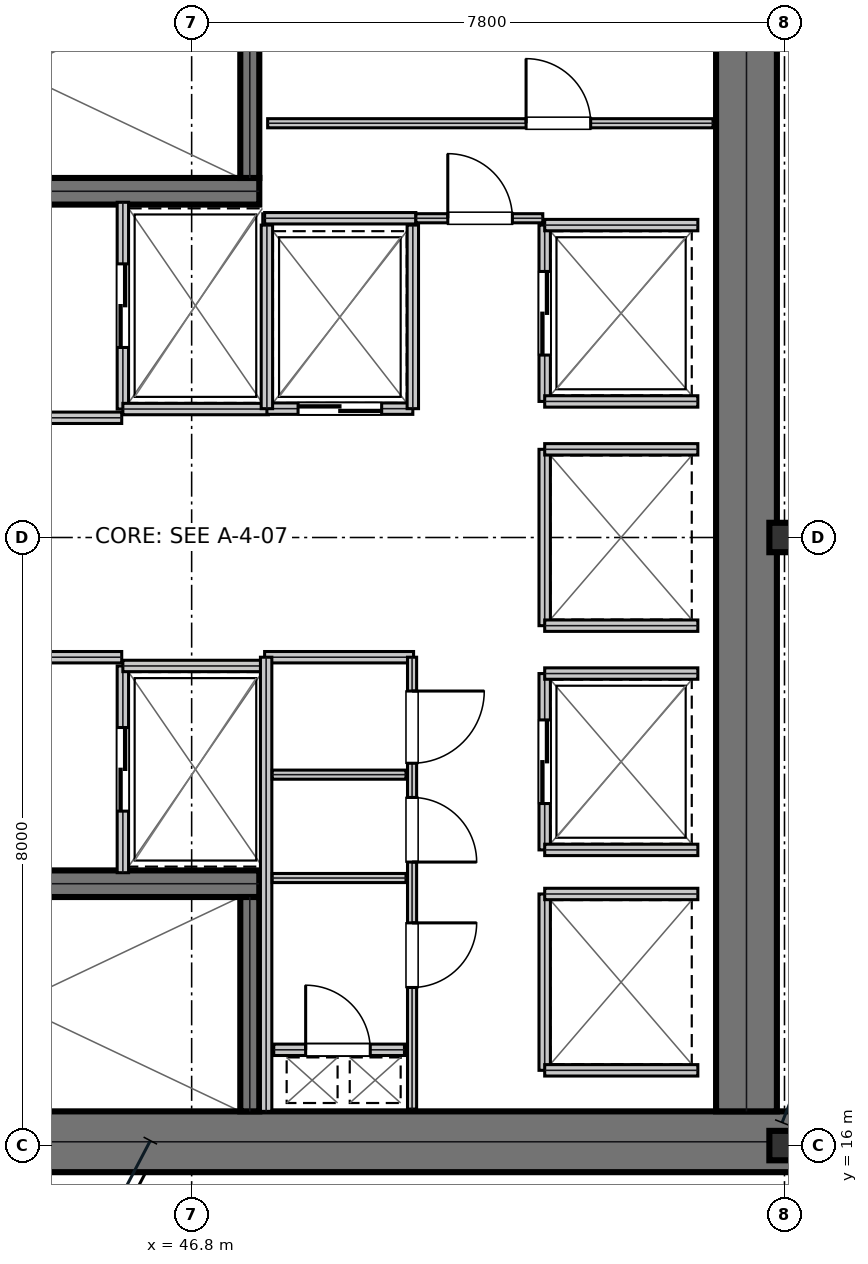
"""IFC4 building model, lengths in metres.
Left out: names, types, materials, properties, quantities, classifications, styles, units other than length and angle.
Written with IfcOpenShell. Run it as: python <this file> out.ifc"""

import sys

from ifc_helpers import new_model, si_unit, direction, frame, frame_2d, origin, origin_2d, place, context, subcontext, project, spatial, rectangle, i_section, extrude, element, fill, save


model = new_model("IFC4")
c1 = context("Model", 3, precision=1e-05, world=origin(), true_north=direction((0.0, 1.0)))
c2 = subcontext(c1, "Body", "Model", "MODEL_VIEW")
j1 = project(units=[si_unit("LENGTHUNIT", "METRE"), si_unit("PLANEANGLEUNIT", "RADIAN")], contexts=[c1])
p1 = place(None, origin())
s1 = spatial("IfcSite", under=j1, at=p1, CompositionType="ELEMENT")
p2 = place(p1, origin())
s2 = spatial("IfcBuilding", under=s1, at=p2, CompositionType="ELEMENT")
p3 = place(p2, frame((0.0, 0.0, 145.2)))
s3 = spatial("IfcBuildingStorey", under=s2, at=p3, CompositionType="ELEMENT", Elevation=145.2)
p4 = place(p3, frame((38.8, 16.05, 0.0), z_axis=(0.0, 0.0, 1.0), x_axis=(1.0, 0.0, 0.0)))
e1 = element("IfcWall", 1, at=p4, inside=s3, PredefinedType="SHEAR", context=c2, shape_type="SweptSolid", body=[
    extrude(rectangle(XDim=16.0, YDim=0.8, at=frame_2d((8.0, 0.0))), origin(), (0.0, 0.0, 1.0), 3.81),
])
p5 = place(p3, frame((54.1, 16.45, 0.0), z_axis=(0.0, 0.0, 1.0), x_axis=(0.0, 1.0, 0.0)))
e2 = element("IfcWall", 2, at=p5, inside=s3, PredefinedType="SHEAR", context=c2, shape_type="SweptSolid", body=[
    extrude(rectangle(XDim=15.1, YDim=0.8, at=frame_2d((7.55, 0.0))), origin(), (0.0, 0.0, 1.0), 3.81),
])
p6 = place(p3, frame((39.98, 28.555, 0.0), z_axis=(0.0, 0.0, 1.0), x_axis=(1.0, 0.0, 0.0)))
e3 = element("IfcWall", 3, at=p6, inside=s3, PredefinedType="SHEAR", context=c2, shape_type="SweptSolid", body=[
    extrude(rectangle(XDim=7.71, YDim=0.35, at=frame_2d((3.855, 0.0))), origin(), (0.0, 0.0, 1.0), 3.81),
])
p7 = place(p6, frame((0.25, 0.0, 0.0)))
e4 = element("IfcOpeningElement", 4, at=p7, cuts=e3, PredefinedType="OPENING", context=c2, shape_type="SweptSolid", body=[
    extrude(rectangle(XDim=1.1, YDim=2.15, at=frame_2d((0.55, 1.075))), frame((0.0, 0.185, 0.0), z_axis=(0.0, -1.0, 0.0), x_axis=(1.0, 0.0, 0.0)), (0.0, 0.0, 1.0), 0.37),
])
p8 = place(p3, frame((39.98, 19.445, 0.0), z_axis=(0.0, 0.0, 1.0), x_axis=(1.0, 0.0, 0.0)))
e5 = element("IfcWall", 5, at=p8, inside=s3, PredefinedType="SHEAR", context=c2, shape_type="SweptSolid", body=[
    extrude(rectangle(XDim=7.71, YDim=0.35, at=frame_2d((3.855, 0.0))), origin(), (0.0, 0.0, 1.0), 3.81),
])
p9 = place(p8, frame((0.25, 0.0, 0.0)))
e6 = element("IfcOpeningElement", 6, at=p9, cuts=e5, PredefinedType="OPENING", context=c2, shape_type="SweptSolid", body=[
    extrude(rectangle(XDim=1.1, YDim=2.15, at=frame_2d((0.55, 1.075))), frame((0.0, 0.185, 0.0), z_axis=(0.0, -1.0, 0.0), x_axis=(1.0, 0.0, 0.0)), (0.0, 0.0, 1.0), 0.37),
])
for number, where, z_axis, x_axis in (
    (7, (47.565, 28.73, 0.0), (0.0, 0.0, 1.0), (0.0, 1.0, 0.0)),
    (8, (47.565, 16.45, 0.0), (0.0, 0.0, 1.0), (0.0, 1.0, 0.0)),
):
    element("IfcWall", number, at=place(p3, frame(where, z_axis=z_axis, x_axis=x_axis)), inside=s3, PredefinedType="SHEAR", context=c2, shape_type="SweptSolid", body=[
        extrude(rectangle(XDim=2.82, YDim=0.25, at=frame_2d((1.41, 0.0))), origin(), (0.0, 0.0, 1.0), 3.81),
    ])
for number, where, z_axis, x_axis in (
    (9, (54.6, 16.0, 0.0), (0.0, 0.0, 1.0), (1.0, 0.0, 0.0)),
    (10, (54.6, 24.0, 0.0), (0.0, 0.0, 1.0), (1.0, 0.0, 0.0)),
):
    element("IfcColumn", number, at=place(p3, frame(where, z_axis=z_axis, x_axis=x_axis)), inside=s3, PredefinedType="COLUMN", context=c2, shape_type="SweptSolid", body=[
        extrude(i_section(OverallWidth=0.398, OverallDepth=0.387, WebThickness=0.021, FlangeThickness=0.033, at=origin_2d()), origin(), (0.0, 0.0, 1.0), 4.044),
    ])
p10 = place(p3, frame((39.98, 25.575, 0.0), z_axis=(0.0, 0.0, 1.0), x_axis=(1.0, 0.0, 0.0)))
e11 = element("IfcWall", 11, at=p10, inside=s3, PredefinedType="PARTITIONING", context=c2, shape_type="SweptSolid", body=[
    extrude(rectangle(XDim=5.9, YDim=0.15, at=frame_2d((2.95, 0.0))), origin(), (0.0, 0.0, 1.0), 3.81),
])
p11 = place(p10, frame((2.35, 0.0, 0.0)))
e12 = element("IfcOpeningElement", 12, at=p11, cuts=e11, PredefinedType="OPENING", context=c2, shape_type="SweptSolid", body=[
    extrude(rectangle(XDim=1.05, YDim=2.15, at=frame_2d((0.525, 1.075))), frame((0.0, 0.085, 0.0), z_axis=(0.0, -1.0, 0.0), x_axis=(1.0, 0.0, 0.0)), (0.0, 0.0, 1.0), 0.17),
])
p12 = place(p3, frame((39.98, 22.425, 0.0), z_axis=(0.0, 0.0, 1.0), x_axis=(1.0, 0.0, 0.0)))
e13 = element("IfcWall", 13, at=p12, inside=s3, PredefinedType="PARTITIONING", context=c2, shape_type="SweptSolid", body=[
    extrude(rectangle(XDim=5.9, YDim=0.15, at=frame_2d((2.95, 0.0))), origin(), (0.0, 0.0, 1.0), 3.81),
])
p13 = place(p12, frame((2.35, 0.0, 0.0)))
e14 = element("IfcOpeningElement", 14, at=p13, cuts=e13, PredefinedType="OPENING", context=c2, shape_type="SweptSolid", body=[
    extrude(rectangle(XDim=1.05, YDim=2.15, at=frame_2d((0.525, 1.075))), frame((0.0, 0.085, 0.0), z_axis=(0.0, -1.0, 0.0), x_axis=(1.0, 0.0, 0.0)), (0.0, 0.0, 1.0), 0.17),
])
p14 = place(p3, frame((45.895, 25.69, 0.0), z_axis=(0.0, 0.0, 1.0), x_axis=(0.0, 1.0, 0.0)))
e15 = element("IfcWall", 15, at=p14, inside=s3, PredefinedType="PARTITIONING", context=c2, shape_type="SweptSolid", body=[
    extrude(rectangle(XDim=2.72, YDim=0.15, at=frame_2d((1.36, 0.0))), origin(), (0.0, 0.0, 1.0), 3.81),
])
p15 = place(p14, frame((0.81, 0.0, 0.0)))
e16 = element("IfcOpeningElement", 16, at=p15, cuts=e15, PredefinedType="OPENING", context=c2, shape_type="SweptSolid", body=[
    extrude(rectangle(XDim=1.1, YDim=2.15, at=frame_2d((0.55, 1.075))), frame((0.0, 0.085, 0.0), z_axis=(0.0, -1.0, 0.0), x_axis=(1.0, 0.0, 0.0)), (0.0, 0.0, 1.0), 0.17),
])
p16 = place(p3, frame((45.895, 25.69, 0.0), z_axis=(0.0, 0.0, 1.0), x_axis=(1.0, 0.0, 0.0)))
e17 = element("IfcWall", 17, at=p16, inside=s3, PredefinedType="PARTITIONING", context=c2, shape_type="SweptSolid", body=[
    extrude(rectangle(XDim=1.915, YDim=0.15, at=frame_2d((0.958, 0.0))), origin(), (0.0, 0.0, 1.0), 3.81),
])
p17 = place(p3, frame((45.895, 19.59, 0.0), z_axis=(0.0, 0.0, 1.0), x_axis=(0.0, 1.0, 0.0)))
e18 = element("IfcWall", 18, at=p17, inside=s3, PredefinedType="PARTITIONING", context=c2, shape_type="SweptSolid", body=[
    extrude(rectangle(XDim=2.72, YDim=0.15, at=frame_2d((1.36, 0.0))), origin(), (0.0, 0.0, 1.0), 3.81),
])
p18 = place(p17, frame((0.81, 0.0, 0.0)))
e19 = element("IfcOpeningElement", 19, at=p18, cuts=e18, PredefinedType="OPENING", context=c2, shape_type="SweptSolid", body=[
    extrude(rectangle(XDim=1.1, YDim=2.15, at=frame_2d((0.55, 1.075))), frame((0.0, 0.085, 0.0), z_axis=(0.0, -1.0, 0.0), x_axis=(1.0, 0.0, 0.0)), (0.0, 0.0, 1.0), 0.17),
])
p19 = place(p3, frame((45.895, 22.31, 0.0), z_axis=(0.0, 0.0, 1.0), x_axis=(1.0, 0.0, 0.0)))
e20 = element("IfcWall", 20, at=p19, inside=s3, PredefinedType="PARTITIONING", context=c2, shape_type="SweptSolid", body=[
    extrude(rectangle(XDim=1.915, YDim=0.15, at=frame_2d((0.958, 0.0))), origin(), (0.0, 0.0, 1.0), 3.81),
])
p20 = place(p3, frame((47.79, 25.695, 0.0), z_axis=(0.0, 0.0, 1.0), x_axis=(1.0, 0.0, 0.0)))
e21 = element("IfcWall", 21, at=p20, inside=s3, PredefinedType="PARTITIONING", context=c2, shape_type="SweptSolid", body=[
    extrude(rectangle(XDim=1.92, YDim=0.15, at=frame_2d((0.96, 0.0))), origin(), (0.0, 0.0, 1.0), 3.81),
])
p21 = place(p20, frame((0.41, 0.0, 0.0)))
e22 = element("IfcOpeningElement", 22, at=p21, cuts=e21, PredefinedType="OPENING", context=c2, shape_type="SweptSolid", body=[
    extrude(rectangle(XDim=1.1, YDim=2.15, at=frame_2d((0.55, 1.075))), frame((0.0, 0.085, 0.0), z_axis=(0.0, -1.0, 0.0), x_axis=(1.0, 0.0, 0.0)), (0.0, 0.0, 1.0), 0.17),
])
for number, where, z_axis, x_axis in (
    (23, (47.79, 25.695, 0.0), (0.0, 0.0, 1.0), (0.0, 1.0, 0.0)),
    (24, (49.71, 25.695, 0.0), (0.0, 0.0, 1.0), (0.0, 1.0, 0.0)),
):
    element("IfcWall", number, at=place(p3, frame(where, z_axis=z_axis, x_axis=x_axis)), inside=s3, PredefinedType="PARTITIONING", context=c2, shape_type="SweptSolid", body=[
        extrude(rectangle(XDim=2.415, YDim=0.15, at=frame_2d((1.208, 0.0))), origin(), (0.0, 0.0, 1.0), 3.81),
    ])
p22 = place(p3, frame((51.445, 25.79, 0.0), z_axis=(0.0, 0.0, 1.0), x_axis=(0.0, 1.0, 0.0)))
e25 = element("IfcWall", 25, at=p22, inside=s3, PredefinedType="PARTITIONING", context=c2, shape_type="SweptSolid", body=[
    extrude(rectangle(XDim=2.32, YDim=0.15, at=frame_2d((1.16, 0.0))), origin(), (0.0, 0.0, 1.0), 3.81),
])
p23 = place(p22, frame((0.61, 0.0, 0.0)))
e26 = element("IfcOpeningElement", 26, at=p23, cuts=e25, PredefinedType="OPENING", context=c2, shape_type="SweptSolid", body=[
    extrude(rectangle(XDim=1.1, YDim=2.15, at=frame_2d((0.55, 1.075))), frame((0.0, 0.085, 0.0), z_axis=(0.0, -1.0, 0.0), x_axis=(1.0, 0.0, 0.0)), (0.0, 0.0, 1.0), 0.17),
])
for number, where, z_axis, x_axis in (
    (27, (51.445, 25.79, 0.0), (0.0, 0.0, 1.0), (1.0, 0.0, 0.0)),
    (28, (51.445, 28.11, 0.0), (0.0, 0.0, 1.0), (1.0, 0.0, 0.0)),
):
    element("IfcWall", number, at=place(p3, frame(where, z_axis=z_axis, x_axis=x_axis)), inside=s3, PredefinedType="PARTITIONING", context=c2, shape_type="SweptSolid", body=[
        extrude(rectangle(XDim=2.015, YDim=0.15, at=frame_2d((1.007, 0.0))), origin(), (0.0, 0.0, 1.0), 3.81),
    ])
p24 = place(p3, frame((51.445, 19.89, 0.0), z_axis=(0.0, 0.0, 1.0), x_axis=(0.0, 1.0, 0.0)))
e29 = element("IfcWall", 29, at=p24, inside=s3, PredefinedType="PARTITIONING", context=c2, shape_type="SweptSolid", body=[
    extrude(rectangle(XDim=2.32, YDim=0.15, at=frame_2d((1.16, 0.0))), origin(), (0.0, 0.0, 1.0), 3.81),
])
p25 = place(p24, frame((0.61, 0.0, 0.0)))
e30 = element("IfcOpeningElement", 30, at=p25, cuts=e29, PredefinedType="OPENING", context=c2, shape_type="SweptSolid", body=[
    extrude(rectangle(XDim=1.1, YDim=2.15, at=frame_2d((0.55, 1.075))), frame((0.0, 0.085, 0.0), z_axis=(0.0, -1.0, 0.0), x_axis=(1.0, 0.0, 0.0)), (0.0, 0.0, 1.0), 0.17),
])
for number, where, z_axis, x_axis in (
    (31, (51.445, 19.89, 0.0), (0.0, 0.0, 1.0), (1.0, 0.0, 0.0)),
    (32, (51.445, 22.21, 0.0), (0.0, 0.0, 1.0), (1.0, 0.0, 0.0)),
):
    element("IfcWall", number, at=place(p3, frame(where, z_axis=z_axis, x_axis=x_axis)), inside=s3, PredefinedType="PARTITIONING", context=c2, shape_type="SweptSolid", body=[
        extrude(rectangle(XDim=2.015, YDim=0.15, at=frame_2d((1.007, 0.0))), origin(), (0.0, 0.0, 1.0), 3.81),
    ])
p26 = place(p3, frame((51.445, 22.84, 0.0), z_axis=(0.0, 0.0, 1.0), x_axis=(0.0, 1.0, 0.0)))
e33 = element("IfcWall", 33, at=p26, inside=s3, PredefinedType="PARTITIONING", context=c2, shape_type="SweptSolid", body=[
    extrude(rectangle(XDim=2.32, YDim=0.15, at=frame_2d((1.16, 0.0))), origin(), (0.0, 0.0, 1.0), 3.81),
])
for number, where, z_axis, x_axis in (
    (34, (51.445, 22.84, 0.0), (0.0, 0.0, 1.0), (1.0, 0.0, 0.0)),
    (35, (51.445, 25.16, 0.0), (0.0, 0.0, 1.0), (1.0, 0.0, 0.0)),
):
    element("IfcWall", number, at=place(p3, frame(where, z_axis=z_axis, x_axis=x_axis)), inside=s3, PredefinedType="PARTITIONING", context=c2, shape_type="SweptSolid", body=[
        extrude(rectangle(XDim=2.015, YDim=0.15, at=frame_2d((1.007, 0.0))), origin(), (0.0, 0.0, 1.0), 3.81),
    ])
p27 = place(p3, frame((51.445, 16.99, 0.0), z_axis=(0.0, 0.0, 1.0), x_axis=(0.0, 1.0, 0.0)))
e36 = element("IfcWall", 36, at=p27, inside=s3, PredefinedType="PARTITIONING", context=c2, shape_type="SweptSolid", body=[
    extrude(rectangle(XDim=2.32, YDim=0.15, at=frame_2d((1.16, 0.0))), origin(), (0.0, 0.0, 1.0), 3.81),
])
for number, where, z_axis, x_axis in (
    (37, (51.445, 16.99, 0.0), (0.0, 0.0, 1.0), (1.0, 0.0, 0.0)),
    (38, (51.445, 19.31, 0.0), (0.0, 0.0, 1.0), (1.0, 0.0, 0.0)),
):
    element("IfcWall", number, at=place(p3, frame(where, z_axis=z_axis, x_axis=x_axis)), inside=s3, PredefinedType="PARTITIONING", context=c2, shape_type="SweptSolid", body=[
        extrude(rectangle(XDim=2.015, YDim=0.15, at=frame_2d((1.007, 0.0))), origin(), (0.0, 0.0, 1.0), 3.81),
    ])
p28 = place(p3, frame((47.88, 17.26, 0.0), z_axis=(0.0, 0.0, 1.0), x_axis=(1.0, 0.0, 0.0)))
e39 = element("IfcWall", 39, at=p28, inside=s3, PredefinedType="PARTITIONING", context=c2, shape_type="SweptSolid", body=[
    extrude(rectangle(XDim=1.72, YDim=0.15, at=frame_2d((0.86, 0.0))), origin(), (0.0, 0.0, 1.0), 3.81),
])
p29 = place(p28, frame((0.42, 0.0, 0.0)))
e40 = element("IfcOpeningElement", 40, at=p29, cuts=e39, PredefinedType="OPENING", context=c2, shape_type="SweptSolid", body=[
    extrude(rectangle(XDim=0.85, YDim=2.15, at=frame_2d((0.425, 1.075))), frame((0.0, 0.085, 0.0), z_axis=(0.0, -1.0, 0.0), x_axis=(1.0, 0.0, 0.0)), (0.0, 0.0, 1.0), 0.17),
])
p30 = place(p3, frame((47.76, 22.425, 0.0), z_axis=(0.0, 0.0, 1.0), x_axis=(1.0, 0.0, 0.0)))
e41 = element("IfcWall", 41, at=p30, inside=s3, PredefinedType="PARTITIONING", context=c2, shape_type="SweptSolid", body=[
    extrude(rectangle(XDim=1.96, YDim=0.15, at=frame_2d((0.98, 0.0))), origin(), (0.0, 0.0, 1.0), 3.81),
])
p31 = place(p3, frame((47.78, 16.45, 0.0), z_axis=(0.0, 0.0, 1.0), x_axis=(0.0, 1.0, 0.0)))
e42 = element("IfcWall", 42, at=p31, inside=s3, PredefinedType="PARTITIONING", context=c2, shape_type="SweptSolid", body=[
    extrude(rectangle(XDim=5.975, YDim=0.15, at=frame_2d((2.988, 0.0))), origin(), (0.0, 0.0, 1.0), 3.81),
])
for number, where, z_axis, x_axis in (
    (43, (47.86, 19.52, 0.0), (0.0, 0.0, 1.0), (1.0, 0.0, 0.0)),
    (44, (47.86, 20.88, 0.0), (0.0, 0.0, 1.0), (1.0, 0.0, 0.0)),
):
    element("IfcWall", number, at=place(p3, frame(where, z_axis=z_axis, x_axis=x_axis)), inside=s3, PredefinedType="PARTITIONING", context=c2, shape_type="SweptSolid", body=[
        extrude(rectangle(XDim=1.76, YDim=0.12, at=frame_2d((0.88, 0.0))), origin(), (0.0, 0.0, 1.0), 3.81),
    ])
p32 = place(p3, frame((49.7, 16.48, 0.0), z_axis=(0.0, 0.0, 1.0), x_axis=(0.0, 1.0, 0.0)))
e45 = element("IfcWall", 45, at=p32, inside=s3, PredefinedType="PARTITIONING", context=c2, shape_type="SweptSolid", body=[
    extrude(rectangle(XDim=5.945, YDim=0.12, at=frame_2d((2.973, 0.0))), origin(), (0.0, 0.0, 1.0), 3.81),
])
p33 = place(p32, frame((1.6, 0.0, 0.0)))
e46 = element("IfcOpeningElement", 46, at=p33, cuts=e45, PredefinedType="OPENING", context=c2, shape_type="SweptSolid", body=[
    extrude(rectangle(XDim=0.85, YDim=2.15, at=frame_2d((0.425, 1.075))), frame((0.0, 0.07, 0.0), z_axis=(0.0, -1.0, 0.0), x_axis=(1.0, 0.0, 0.0)), (0.0, 0.0, 1.0), 0.14),
])
p34 = place(p32, frame((3.25, 0.0, 0.0)))
e47 = element("IfcOpeningElement", 47, at=p34, cuts=e45, PredefinedType="OPENING", context=c2, shape_type="SweptSolid", body=[
    extrude(rectangle(XDim=0.85, YDim=2.15, at=frame_2d((0.425, 1.075))), frame((0.0, 0.07, 0.0), z_axis=(0.0, -1.0, 0.0), x_axis=(1.0, 0.0, 0.0)), (0.0, 0.0, 1.0), 0.14),
])
p35 = place(p32, frame((4.55, 0.0, 0.0)))
e48 = element("IfcOpeningElement", 48, at=p35, cuts=e45, PredefinedType="OPENING", context=c2, shape_type="SweptSolid", body=[
    extrude(rectangle(XDim=0.95, YDim=2.15, at=frame_2d((0.475, 1.075))), frame((0.0, 0.07, 0.0), z_axis=(0.0, -1.0, 0.0), x_axis=(1.0, 0.0, 0.0)), (0.0, 0.0, 1.0), 0.14),
])
p36 = place(p3, frame((47.76, 28.2, 0.0), z_axis=(0.0, 0.0, 1.0), x_axis=(1.0, 0.0, 0.0)))
e49 = element("IfcWall", 49, at=p36, inside=s3, PredefinedType="PARTITIONING", context=c2, shape_type="SweptSolid", body=[
    extrude(rectangle(XDim=1.99, YDim=0.15, at=frame_2d((0.995, 0.0))), origin(), (0.0, 0.0, 1.0), 3.81),
])
p37 = place(p3, frame((49.75, 28.2, 0.0), z_axis=(0.0, 0.0, 1.0), x_axis=(1.0, 0.0, 0.0)))
e50 = element("IfcWall", 50, at=p37, inside=s3, PredefinedType="PARTITIONING", context=c2, shape_type="SweptSolid", body=[
    extrude(rectangle(XDim=1.67, YDim=0.12, at=frame_2d((0.835, 0.0))), origin(), (0.0, 0.0, 1.0), 3.81),
])
p38 = place(p37, frame((0.42, 0.0, 0.0)))
e51 = element("IfcOpeningElement", 51, at=p38, cuts=e50, PredefinedType="OPENING", context=c2, shape_type="SweptSolid", body=[
    extrude(rectangle(XDim=0.85, YDim=2.15, at=frame_2d((0.425, 1.075))), frame((0.0, 0.07, 0.0), z_axis=(0.0, -1.0, 0.0), x_axis=(1.0, 0.0, 0.0)), (0.0, 0.0, 1.0), 0.14),
])
p39 = place(p3, frame((47.8, 29.45, 0.0), z_axis=(0.0, 0.0, 1.0), x_axis=(1.0, 0.0, 0.0)))
e52 = element("IfcWall", 52, at=p39, inside=s3, PredefinedType="PARTITIONING", context=c2, shape_type="SweptSolid", body=[
    extrude(rectangle(XDim=5.86, YDim=0.12, at=frame_2d((2.93, 0.0))), origin(), (0.0, 0.0, 1.0), 3.81),
])
p40 = place(p39, frame((3.4, 0.0, 0.0)))
e53 = element("IfcOpeningElement", 53, at=p40, cuts=e52, PredefinedType="OPENING", context=c2, shape_type="SweptSolid", body=[
    extrude(rectangle(XDim=0.85, YDim=2.15, at=frame_2d((0.425, 1.075))), frame((0.0, 0.07, 0.0), z_axis=(0.0, -1.0, 0.0), x_axis=(1.0, 0.0, 0.0)), (0.0, 0.0, 1.0), 0.14),
])
p41 = place(p15, frame((1.1, 0.0, 0.0), z_axis=(0.0, 0.0, 1.0), x_axis=(-1.0, 0.0, 0.0)))
e54 = element("IfcDoor", 54, at=p41, inside=s3, OperationType="DOUBLE_DOOR_SLIDING", PredefinedType="DOOR", context=c2, shape_type="SweptSolid", body=[
    extrude(rectangle(XDim=1.1, YDim=2.15, at=frame_2d((0.55, 1.075))), frame((0.0, 0.025, 0.0), z_axis=(0.0, -1.0, 0.0), x_axis=(1.0, 0.0, 0.0)), (0.0, 0.0, 1.0), 0.05),
])
fill(e16, e54)
p42 = place(p18, frame((1.1, 0.0, 0.0), z_axis=(0.0, 0.0, 1.0), x_axis=(-1.0, 0.0, 0.0)))
e55 = element("IfcDoor", 55, at=p42, inside=s3, OperationType="DOUBLE_DOOR_SLIDING", PredefinedType="DOOR", context=c2, shape_type="SweptSolid", body=[
    extrude(rectangle(XDim=1.1, YDim=2.15, at=frame_2d((0.55, 1.075))), frame((0.0, 0.025, 0.0), z_axis=(0.0, -1.0, 0.0), x_axis=(1.0, 0.0, 0.0)), (0.0, 0.0, 1.0), 0.05),
])
fill(e19, e55)
p43 = place(p21, frame((1.1, 0.0, 0.0), z_axis=(0.0, 0.0, 1.0), x_axis=(-1.0, 0.0, 0.0)))
e56 = element("IfcDoor", 56, at=p43, inside=s3, OperationType="DOUBLE_DOOR_SLIDING", PredefinedType="DOOR", context=c2, shape_type="SweptSolid", body=[
    extrude(rectangle(XDim=1.1, YDim=2.15, at=frame_2d((0.55, 1.075))), frame((0.0, 0.025, 0.0), z_axis=(0.0, -1.0, 0.0), x_axis=(1.0, 0.0, 0.0)), (0.0, 0.0, 1.0), 0.05),
])
fill(e22, e56)
p44 = place(p23, frame((1.1, 0.0, 0.0), z_axis=(0.0, 0.0, 1.0), x_axis=(-1.0, 0.0, 0.0)))
e57 = element("IfcDoor", 57, at=p44, inside=s3, OperationType="DOUBLE_DOOR_SLIDING", PredefinedType="DOOR", context=c2, shape_type="SweptSolid", body=[
    extrude(rectangle(XDim=1.1, YDim=2.15, at=frame_2d((0.55, 1.075))), frame((0.0, 0.025, 0.0), z_axis=(0.0, -1.0, 0.0), x_axis=(1.0, 0.0, 0.0)), (0.0, 0.0, 1.0), 0.05),
])
fill(e26, e57)
p45 = place(p25, frame((1.1, 0.0, 0.0), z_axis=(0.0, 0.0, 1.0), x_axis=(-1.0, 0.0, 0.0)))
e58 = element("IfcDoor", 58, at=p45, inside=s3, OperationType="DOUBLE_DOOR_SLIDING", PredefinedType="DOOR", context=c2, shape_type="SweptSolid", body=[
    extrude(rectangle(XDim=1.1, YDim=2.15, at=frame_2d((0.55, 1.075))), frame((0.0, 0.025, 0.0), z_axis=(0.0, -1.0, 0.0), x_axis=(1.0, 0.0, 0.0)), (0.0, 0.0, 1.0), 0.05),
])
fill(e30, e58)
p46 = place(p29, origin())
e59 = element("IfcDoor", 59, at=p46, inside=s3, OperationType="SINGLE_SWING_LEFT", PredefinedType="TRAPDOOR", context=c2, shape_type="SweptSolid", body=[
    extrude(rectangle(XDim=0.85, YDim=2.15, at=frame_2d((0.425, 1.075))), frame((0.0, 0.025, 0.0), z_axis=(0.0, -1.0, 0.0), x_axis=(1.0, 0.0, 0.0)), (0.0, 0.0, 1.0), 0.05),
])
fill(e40, e59)
p47 = place(p33, frame((0.85, 0.0, 0.0), z_axis=(0.0, 0.0, 1.0), x_axis=(-1.0, 0.0, 0.0)))
e60 = element("IfcDoor", 60, at=p47, inside=s3, OperationType="SINGLE_SWING_LEFT", PredefinedType="DOOR", context=c2, shape_type="SweptSolid", body=[
    extrude(rectangle(XDim=0.85, YDim=2.15, at=frame_2d((0.425, 1.075))), frame((0.0, 0.025, 0.0), z_axis=(0.0, -1.0, 0.0), x_axis=(1.0, 0.0, 0.0)), (0.0, 0.0, 1.0), 0.05),
])
fill(e46, e60)
p48 = place(p34, frame((0.85, 0.0, 0.0), z_axis=(0.0, 0.0, 1.0), x_axis=(-1.0, 0.0, 0.0)))
e61 = element("IfcDoor", 61, at=p48, inside=s3, OperationType="SINGLE_SWING_RIGHT", PredefinedType="DOOR", context=c2, shape_type="SweptSolid", body=[
    extrude(rectangle(XDim=0.85, YDim=2.15, at=frame_2d((0.425, 1.075))), frame((0.0, 0.025, 0.0), z_axis=(0.0, -1.0, 0.0), x_axis=(1.0, 0.0, 0.0)), (0.0, 0.0, 1.0), 0.05),
])
fill(e47, e61)
p49 = place(p35, frame((0.95, 0.0, 0.0), z_axis=(0.0, 0.0, 1.0), x_axis=(-1.0, 0.0, 0.0)))
e62 = element("IfcDoor", 62, at=p49, inside=s3, OperationType="SINGLE_SWING_LEFT", PredefinedType="DOOR", context=c2, shape_type="SweptSolid", body=[
    extrude(rectangle(XDim=0.95, YDim=2.15, at=frame_2d((0.475, 1.075))), frame((0.0, 0.025, 0.0), z_axis=(0.0, -1.0, 0.0), x_axis=(1.0, 0.0, 0.0)), (0.0, 0.0, 1.0), 0.05),
])
fill(e48, e62)
p50 = place(p38, origin())
e63 = element("IfcDoor", 63, at=p50, inside=s3, OperationType="SINGLE_SWING_LEFT", PredefinedType="DOOR", context=c2, shape_type="SweptSolid", body=[
    extrude(rectangle(XDim=0.85, YDim=2.15, at=frame_2d((0.425, 1.075))), frame((0.0, 0.025, 0.0), z_axis=(0.0, -1.0, 0.0), x_axis=(1.0, 0.0, 0.0)), (0.0, 0.0, 1.0), 0.05),
])
fill(e51, e63)
p51 = place(p40, origin())
e64 = element("IfcDoor", 64, at=p51, inside=s3, OperationType="SINGLE_SWING_LEFT", PredefinedType="DOOR", context=c2, shape_type="SweptSolid", body=[
    extrude(rectangle(XDim=0.85, YDim=2.15, at=frame_2d((0.425, 1.075))), frame((0.0, 0.025, 0.0), z_axis=(0.0, -1.0, 0.0), x_axis=(1.0, 0.0, 0.0)), (0.0, 0.0, 1.0), 0.05),
])
fill(e53, e64)
save(model, sys.argv[1])
